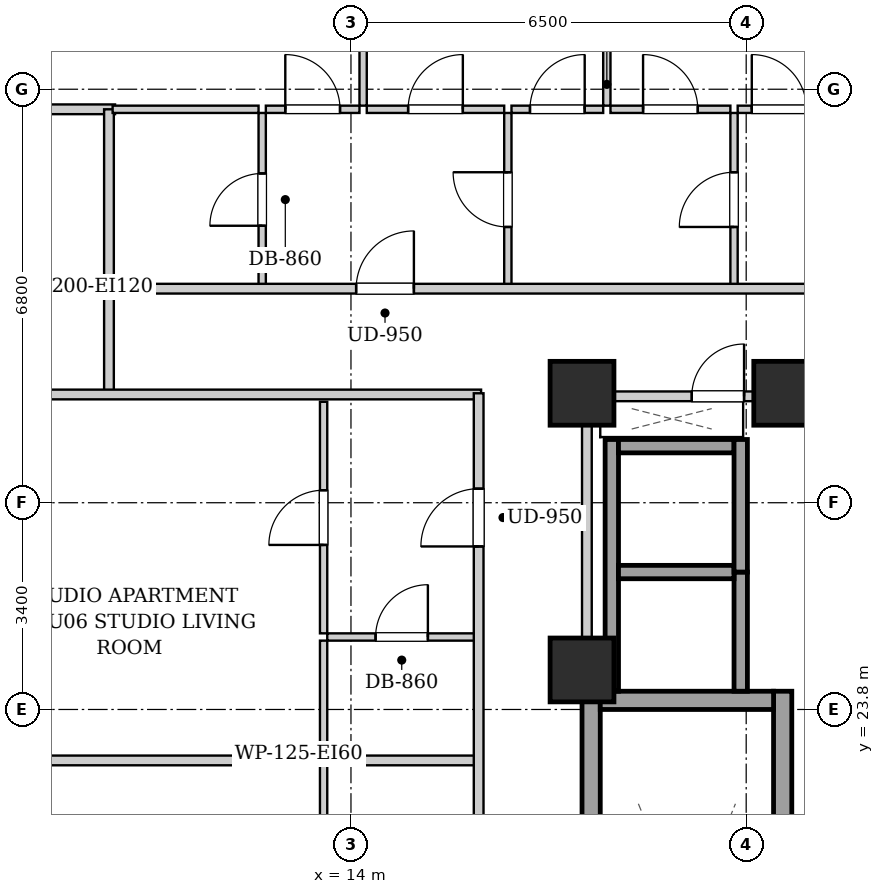
"""IFC4 building model, lengths in metres.
Left out: names, types, materials, properties, quantities, classifications, styles, units other than length and angle.
Written with IfcOpenShell. Run it as: python <this file> out.ifc"""

import sys

from ifc_helpers import new_model, si_unit, direction, frame, frame_2d, origin, origin_2d, place, context, subcontext, project, spatial, rectangle, extrude, element, fill, save


model = new_model("IFC4")
c1 = context("Model", 3, precision=1e-05, world=origin(), true_north=direction((0.0, 1.0)))
c2 = subcontext(c1, "Body", "Model", "MODEL_VIEW")
j1 = project(units=[si_unit("LENGTHUNIT", "METRE"), si_unit("PLANEANGLEUNIT", "RADIAN")], contexts=[c1])
p1 = place(None, origin())
s1 = spatial("IfcSite", under=j1, at=p1, CompositionType="ELEMENT")
p2 = place(p1, origin())
s2 = spatial("IfcBuilding", under=s1, at=p2, CompositionType="ELEMENT")
p3 = place(p2, frame((0.0, 0.0, 113.5)))
s3 = spatial("IfcBuildingStorey", under=s2, at=p3, CompositionType="ELEMENT", Elevation=113.5)
for number, where, z_axis, x_axis in (
    (1, (17.8, 29.0, 0.0), (0.0, 0.0, 1.0), (1.0, 0.0, 0.0)),
    (2, (21.15, 29.0, 0.0), (0.0, 0.0, 1.0), (1.0, 0.0, 0.0)),
    (3, (17.8, 24.45, 0.0), (0.0, 0.0, 1.0), (1.0, 0.0, 0.0)),
):
    element("IfcColumn", number, at=place(p3, frame(where, z_axis=z_axis, x_axis=x_axis)), inside=s3, PredefinedType="COLUMN", context=c2, shape_type="SweptSolid", body=[
        extrude(rectangle(XDim=1.05, YDim=1.05, at=origin_2d()), origin(), (0.0, 0.0, 1.0), 3.2),
    ])
for number, where, z_axis, x_axis in (
    (4, (17.95, 15.1, 0.0), (0.0, 0.0, 1.0), (0.0, 1.0, 0.0)),
    (5, (21.1, 15.1, 0.0), (0.0, 0.0, 1.0), (0.0, 1.0, 0.0)),
):
    element("IfcWall", number, at=place(p3, frame(where, z_axis=z_axis, x_axis=x_axis)), inside=s3, PredefinedType="SHEAR", context=c2, shape_type="SweptSolid", body=[
        extrude(rectangle(XDim=9.0, YDim=0.3, at=frame_2d((4.5, 0.0))), origin(), (0.0, 0.0, 1.0), 2.94),
    ])
p4 = place(p3, frame((18.1, 23.95, 0.0), z_axis=(0.0, 0.0, 1.0), x_axis=(1.0, 0.0, 0.0)))
e6 = element("IfcWall", 6, at=p4, inside=s3, PredefinedType="SHEAR", context=c2, shape_type="SweptSolid", body=[
    extrude(rectangle(XDim=2.85, YDim=0.3, at=frame_2d((1.425, 0.0))), origin(), (0.0, 0.0, 1.0), 2.94),
])
p5 = place(p3, frame((18.29, 24.1, 0.0), z_axis=(0.0, 0.0, 1.0), x_axis=(0.0, 1.0, 0.0)))
e7 = element("IfcWall", 7, at=p5, inside=s3, PredefinedType="SHEAR", context=c2, shape_type="SweptSolid", body=[
    extrude(rectangle(XDim=4.14, YDim=0.22, at=frame_2d((2.07, 0.0))), origin(), (0.0, 0.0, 1.0), 2.94),
])
p6 = place(p3, frame((20.41, 24.1, 0.0), z_axis=(0.0, 0.0, 1.0), x_axis=(0.0, 1.0, 0.0)))
e8 = element("IfcWall", 8, at=p6, inside=s3, PredefinedType="SHEAR", context=c2, shape_type="SweptSolid", body=[
    extrude(rectangle(XDim=1.96, YDim=0.22, at=frame_2d((0.98, 0.0))), origin(), (0.0, 0.0, 1.0), 2.94),
])
for number, where, z_axis, x_axis in (
    (9, (18.4, 26.06, 0.0), (0.0, 0.0, 1.0), (1.0, 0.0, 0.0)),
    (10, (18.4, 28.13, 0.0), (0.0, 0.0, 1.0), (1.0, 0.0, 0.0)),
):
    element("IfcWall", number, at=place(p3, frame(where, z_axis=z_axis, x_axis=x_axis)), inside=s3, PredefinedType="SHEAR", context=c2, shape_type="SweptSolid", body=[
        extrude(rectangle(XDim=1.9, YDim=0.22, at=frame_2d((0.95, 0.0))), origin(), (0.0, 0.0, 1.0), 2.94),
    ])
p7 = place(p3, frame((20.41, 26.06, 0.0), z_axis=(0.0, 0.0, 1.0), x_axis=(0.0, 1.0, 0.0)))
e11 = element("IfcWall", 11, at=p7, inside=s3, PredefinedType="SHEAR", context=c2, shape_type="SweptSolid", body=[
    extrude(rectangle(XDim=2.18, YDim=0.22, at=frame_2d((1.09, 0.0))), origin(), (0.0, 0.0, 1.0), 2.94),
])
p8 = place(p3, frame((17.88, 24.12, 0.0), z_axis=(0.0, 0.0, 1.0), x_axis=(0.0, 1.0, 0.0)))
e12 = element("IfcWall", 12, at=p8, inside=s3, PredefinedType="PARTITIONING", context=c2, shape_type="SweptSolid", body=[
    extrude(rectangle(XDim=4.76, YDim=0.16, at=frame_2d((2.38, 0.0))), origin(), (0.0, 0.0, 1.0), 2.94),
])
p9 = place(p3, frame((17.96, 28.95, 0.0), z_axis=(0.0, 0.0, 1.0), x_axis=(1.0, 0.0, 0.0)))
e13 = element("IfcWall", 13, at=p9, inside=s3, PredefinedType="PARTITIONING", context=c2, shape_type="SweptSolid", body=[
    extrude(rectangle(XDim=4.29, YDim=0.16, at=frame_2d((2.145, 0.0))), origin(), (0.0, 0.0, 1.0), 2.313),
])
p10 = place(p9, frame((1.645, 0.0, 0.0)))
e14 = element("IfcOpeningElement", 14, at=p10, cuts=e13, PredefinedType="OPENING", context=c2, shape_type="SweptSolid", body=[
    extrude(rectangle(XDim=0.86, YDim=2.05, at=frame_2d((0.43, 1.025))), frame((0.0, 0.09, 0.0), z_axis=(0.0, -1.0, 0.0), x_axis=(1.0, 0.0, 0.0)), (0.0, 0.0, 1.0), 0.18),
])
p11 = place(p3, frame((10.02, 28.98, 0.0), z_axis=(0.0, 0.0, 1.0), x_axis=(0.0, 1.0, 0.0)))
e15 = element("IfcWall", 15, at=p11, inside=s3, PredefinedType="PARTITIONING", context=c2, shape_type="SweptSolid", body=[
    extrude(rectangle(XDim=1.74, YDim=0.16, at=frame_2d((0.87, 0.0))), origin(), (0.0, 0.0, 1.0), 2.94),
])
p12 = place(p3, frame((7.78, 28.98, 0.0), z_axis=(0.0, 0.0, 1.0), x_axis=(1.0, 0.0, 0.0)))
e16 = element("IfcWall", 16, at=p12, inside=s3, PredefinedType="PARTITIONING", context=c2, shape_type="SweptSolid", body=[
    extrude(rectangle(XDim=8.36, YDim=0.16, at=frame_2d((4.18, 0.0))), origin(), (0.0, 0.0, 1.0), 2.313),
])
p13 = place(p3, frame((7.78, 33.67, 0.0), z_axis=(0.0, 0.0, 1.0), x_axis=(1.0, 0.0, 0.0)))
e17 = element("IfcWall", 17, at=p13, inside=s3, PredefinedType="PARTITIONING", context=c2, shape_type="SweptSolid", body=[
    extrude(rectangle(XDim=2.34, YDim=0.16, at=frame_2d((1.17, 0.0))), origin(), (0.0, 0.0, 1.0), 2.94),
])
p14 = place(p3, frame((10.02, 30.76, 0.0), z_axis=(0.0, 0.0, 1.0), x_axis=(0.0, 1.0, 0.0)))
e18 = element("IfcWall", 18, at=p14, inside=s3, PredefinedType="PARTITIONING", context=c2, shape_type="SweptSolid", body=[
    extrude(rectangle(XDim=2.91, YDim=0.16, at=frame_2d((1.455, 0.0))), origin(), (0.0, 0.0, 1.0), 2.94),
])
p15 = place(p3, frame((12.54, 30.76, 0.0), z_axis=(0.0, 0.0, 1.0), x_axis=(0.0, 1.0, 0.0)))
e19 = element("IfcWall", 19, at=p15, inside=s3, PredefinedType="PARTITIONING", context=c2, shape_type="SweptSolid", body=[
    extrude(rectangle(XDim=2.85, YDim=0.12, at=frame_2d((1.425, 0.0))), origin(), (0.0, 0.0, 1.0), 2.94),
])
p16 = place(p15, frame((0.995, 0.0, 0.0)))
e20 = element("IfcOpeningElement", 20, at=p16, cuts=e19, PredefinedType="OPENING", context=c2, shape_type="SweptSolid", body=[
    extrude(rectangle(XDim=0.86, YDim=2.05, at=frame_2d((0.43, 1.025))), frame((0.0, 0.07, 0.0), z_axis=(0.0, -1.0, 0.0), x_axis=(1.0, 0.0, 0.0)), (0.0, 0.0, 1.0), 0.14),
])
p17 = place(p3, frame((10.08, 33.67, 0.0), z_axis=(0.0, 0.0, 1.0), x_axis=(1.0, 0.0, 0.0)))
e21 = element("IfcWall", 21, at=p17, inside=s3, PredefinedType="PARTITIONING", context=c2, shape_type="SweptSolid", body=[
    extrude(rectangle(XDim=2.4, YDim=0.12, at=frame_2d((1.2, 0.0))), origin(), (0.0, 0.0, 1.0), 2.94),
])
p18 = place(p3, frame((16.58, 30.76, 0.0), z_axis=(0.0, 0.0, 1.0), x_axis=(0.0, 1.0, 0.0)))
e22 = element("IfcWall", 22, at=p18, inside=s3, PredefinedType="PARTITIONING", context=c2, shape_type="SweptSolid", body=[
    extrude(rectangle(XDim=2.85, YDim=0.12, at=frame_2d((1.425, 0.0))), origin(), (0.0, 0.0, 1.0), 2.94),
])
p19 = place(p18, frame((0.975, 0.0, 0.0)))
e23 = element("IfcOpeningElement", 23, at=p19, cuts=e22, PredefinedType="OPENING", context=c2, shape_type="SweptSolid", body=[
    extrude(rectangle(XDim=0.9, YDim=2.05, at=frame_2d((0.45, 1.025))), frame((0.0, 0.07, 0.0), z_axis=(0.0, -1.0, 0.0), x_axis=(1.0, 0.0, 0.0)), (0.0, 0.0, 1.0), 0.14),
])
p20 = place(p3, frame((12.6, 33.67, 0.0), z_axis=(0.0, 0.0, 1.0), x_axis=(1.0, 0.0, 0.0)))
e24 = element("IfcWall", 24, at=p20, inside=s3, PredefinedType="PARTITIONING", context=c2, shape_type="SweptSolid", body=[
    extrude(rectangle(XDim=1.54, YDim=0.12, at=frame_2d((0.77, 0.0))), origin(), (0.0, 0.0, 1.0), 2.94),
])
p21 = place(p20, frame((0.32, 0.0, 0.0)))
e25 = element("IfcOpeningElement", 25, at=p21, cuts=e24, PredefinedType="OPENING", context=c2, shape_type="SweptSolid", body=[
    extrude(rectangle(XDim=0.9, YDim=2.05, at=frame_2d((0.45, 1.025))), frame((0.0, 0.07, 0.0), z_axis=(0.0, -1.0, 0.0), x_axis=(1.0, 0.0, 0.0)), (0.0, 0.0, 1.0), 0.14),
])
p22 = place(p3, frame((14.26, 33.67, 0.0), z_axis=(0.0, 0.0, 1.0), x_axis=(1.0, 0.0, 0.0)))
e26 = element("IfcWall", 26, at=p22, inside=s3, PredefinedType="PARTITIONING", context=c2, shape_type="SweptSolid", body=[
    extrude(rectangle(XDim=2.26, YDim=0.12, at=frame_2d((1.13, 0.0))), origin(), (0.0, 0.0, 1.0), 2.94),
])
p23 = place(p22, frame((0.68, 0.0, 0.0)))
e27 = element("IfcOpeningElement", 27, at=p23, cuts=e26, PredefinedType="OPENING", context=c2, shape_type="SweptSolid", body=[
    extrude(rectangle(XDim=0.9, YDim=2.05, at=frame_2d((0.45, 1.025))), frame((0.0, 0.07, 0.0), z_axis=(0.0, -1.0, 0.0), x_axis=(1.0, 0.0, 0.0)), (0.0, 0.0, 1.0), 0.14),
])
p24 = place(p3, frame((20.3, 30.76, 0.0), z_axis=(0.0, 0.0, 1.0), x_axis=(0.0, 1.0, 0.0)))
e28 = element("IfcWall", 28, at=p24, inside=s3, PredefinedType="PARTITIONING", context=c2, shape_type="SweptSolid", body=[
    extrude(rectangle(XDim=2.85, YDim=0.12, at=frame_2d((1.425, 0.0))), origin(), (0.0, 0.0, 1.0), 2.94),
])
p25 = place(p24, frame((0.975, 0.0, 0.0)))
e29 = element("IfcOpeningElement", 29, at=p25, cuts=e28, PredefinedType="OPENING", context=c2, shape_type="SweptSolid", body=[
    extrude(rectangle(XDim=0.9, YDim=2.05, at=frame_2d((0.45, 1.025))), frame((0.0, 0.07, 0.0), z_axis=(0.0, -1.0, 0.0), x_axis=(1.0, 0.0, 0.0)), (0.0, 0.0, 1.0), 0.14),
])
p26 = place(p3, frame((16.64, 33.67, 0.0), z_axis=(0.0, 0.0, 1.0), x_axis=(1.0, 0.0, 0.0)))
e30 = element("IfcWall", 30, at=p26, inside=s3, PredefinedType="PARTITIONING", context=c2, shape_type="SweptSolid", body=[
    extrude(rectangle(XDim=1.508, YDim=0.12, at=frame_2d((0.754, 0.0))), origin(), (0.0, 0.0, 1.0), 2.94),
])
p27 = place(p26, frame((0.304, 0.0, 0.0)))
e31 = element("IfcOpeningElement", 31, at=p27, cuts=e30, PredefinedType="OPENING", context=c2, shape_type="SweptSolid", body=[
    extrude(rectangle(XDim=0.9, YDim=2.05, at=frame_2d((0.45, 1.025))), frame((0.0, 0.07, 0.0), z_axis=(0.0, -1.0, 0.0), x_axis=(1.0, 0.0, 0.0)), (0.0, 0.0, 1.0), 0.14),
])
p28 = place(p3, frame((18.268, 33.67, 0.0), z_axis=(0.0, 0.0, 1.0), x_axis=(1.0, 0.0, 0.0)))
e32 = element("IfcWall", 32, at=p28, inside=s3, PredefinedType="PARTITIONING", context=c2, shape_type="SweptSolid", body=[
    extrude(rectangle(XDim=1.972, YDim=0.12, at=frame_2d((0.986, 0.0))), origin(), (0.0, 0.0, 1.0), 2.94),
])
p29 = place(p28, frame((0.536, 0.0, 0.0)))
e33 = element("IfcOpeningElement", 33, at=p29, cuts=e32, PredefinedType="OPENING", context=c2, shape_type="SweptSolid", body=[
    extrude(rectangle(XDim=0.9, YDim=2.05, at=frame_2d((0.45, 1.025))), frame((0.0, 0.07, 0.0), z_axis=(0.0, -1.0, 0.0), x_axis=(1.0, 0.0, 0.0)), (0.0, 0.0, 1.0), 0.14),
])
p30 = place(p3, frame((20.36, 33.67, 0.0), z_axis=(0.0, 0.0, 1.0), x_axis=(1.0, 0.0, 0.0)))
e34 = element("IfcWall", 34, at=p30, inside=s3, PredefinedType="PARTITIONING", context=c2, shape_type="SweptSolid", body=[
    extrude(rectangle(XDim=1.364, YDim=0.12, at=frame_2d((0.682, 0.0))), origin(), (0.0, 0.0, 1.0), 2.94),
])
p31 = place(p30, frame((0.232, 0.0, 0.0)))
e35 = element("IfcOpeningElement", 35, at=p31, cuts=e34, PredefinedType="OPENING", context=c2, shape_type="SweptSolid", body=[
    extrude(rectangle(XDim=0.9, YDim=2.05, at=frame_2d((0.45, 1.025))), frame((0.0, 0.07, 0.0), z_axis=(0.0, -1.0, 0.0), x_axis=(1.0, 0.0, 0.0)), (0.0, 0.0, 1.0), 0.14),
])
p32 = place(p3, frame((14.2, 33.73, 0.0), z_axis=(0.0, 0.0, 1.0), x_axis=(0.0, 1.0, 0.0)))
e36 = element("IfcWall", 36, at=p32, inside=s3, PredefinedType="PARTITIONING", context=c2, shape_type="SweptSolid", body=[
    extrude(rectangle(XDim=9.29, YDim=0.12, at=frame_2d((4.645, 0.0))), origin(), (0.0, 0.0, 1.0), 2.94),
])
p33 = place(p32, frame((4.18, 0.0, 0.0)))
e37 = element("IfcOpeningElement", 37, at=p33, cuts=e36, PredefinedType="OPENING", context=c2, shape_type="SweptSolid", body=[
    extrude(rectangle(XDim=0.9, YDim=2.05, at=frame_2d((0.45, 1.025))), frame((0.0, 0.07, 0.0), z_axis=(0.0, -1.0, 0.0), x_axis=(1.0, 0.0, 0.0)), (0.0, 0.0, 1.0), 0.14),
])
p34 = place(p3, frame((18.208, 33.73, 0.0), z_axis=(0.0, 0.0, 1.0), x_axis=(0.0, 1.0, 0.0)))
e38 = element("IfcWall", 38, at=p34, inside=s3, PredefinedType="PARTITIONING", context=c2, shape_type="SweptSolid", body=[
    extrude(rectangle(XDim=9.29, YDim=0.12, at=frame_2d((4.645, 0.0))), origin(), (0.0, 0.0, 1.0), 2.94),
])
p35 = place(p34, frame((4.18, 0.0, 0.0)))
e39 = element("IfcOpeningElement", 39, at=p35, cuts=e38, PredefinedType="OPENING", context=c2, shape_type="SweptSolid", body=[
    extrude(rectangle(XDim=0.9, YDim=2.05, at=frame_2d((0.45, 1.025))), frame((0.0, 0.07, 0.0), z_axis=(0.0, -1.0, 0.0), x_axis=(1.0, 0.0, 0.0)), (0.0, 0.0, 1.0), 0.14),
])
p36 = place(p3, frame((7.78, 22.962, 0.0), z_axis=(0.0, 0.0, 1.0), x_axis=(1.0, 0.0, 0.0)))
e40 = element("IfcWall", 40, at=p36, inside=s3, PredefinedType="PARTITIONING", context=c2, shape_type="SweptSolid", body=[
    extrude(rectangle(XDim=8.28, YDim=0.16, at=frame_2d((4.14, 0.0))), origin(), (0.0, 0.0, 1.0), 2.94),
])
p37 = place(p3, frame((13.55, 17.489, 0.0), z_axis=(0.0, 0.0, 1.0), x_axis=(0.0, 1.0, 0.0)))
e41 = element("IfcWall", 41, at=p37, inside=s3, PredefinedType="PARTITIONING", context=c2, shape_type="SweptSolid", body=[
    extrude(rectangle(XDim=5.433, YDim=0.12, at=frame_2d((2.717, 0.0))), origin(), (0.0, 0.0, 1.0), 2.94),
])
p38 = place(p37, frame((2.266, 0.0, 0.0)))
e42 = element("IfcOpeningElement", 42, at=p38, cuts=e41, PredefinedType="OPENING", context=c2, shape_type="SweptSolid", body=[
    extrude(rectangle(XDim=0.9, YDim=2.05, at=frame_2d((0.45, 1.025))), frame((0.0, 0.07, 0.0), z_axis=(0.0, -1.0, 0.0), x_axis=(1.0, 0.0, 0.0)), (0.0, 0.0, 1.0), 0.14),
])
p39 = place(p3, frame((13.61, 24.992, 0.0), z_axis=(0.0, 0.0, 1.0), x_axis=(1.0, 0.0, 0.0)))
e43 = element("IfcWall", 43, at=p39, inside=s3, PredefinedType="PARTITIONING", context=c2, shape_type="SweptSolid", body=[
    extrude(rectangle(XDim=2.45, YDim=0.12, at=frame_2d((1.225, 0.0))), origin(), (0.0, 0.0, 1.0), 2.94),
])
p40 = place(p39, frame((0.795, 0.0, 0.0)))
e44 = element("IfcOpeningElement", 44, at=p40, cuts=e43, PredefinedType="OPENING", context=c2, shape_type="SweptSolid", body=[
    extrude(rectangle(XDim=0.86, YDim=2.05, at=frame_2d((0.43, 1.025))), frame((0.0, 0.07, 0.0), z_axis=(0.0, -1.0, 0.0), x_axis=(1.0, 0.0, 0.0)), (0.0, 0.0, 1.0), 0.14),
])
p41 = place(p3, frame((13.55, 23.082, 0.0), z_axis=(0.0, 0.0, 1.0), x_axis=(0.0, 1.0, 0.0)))
e45 = element("IfcWall", 45, at=p41, inside=s3, PredefinedType="PARTITIONING", context=c2, shape_type="SweptSolid", body=[
    extrude(rectangle(XDim=1.85, YDim=0.12, at=frame_2d((0.925, 0.0))), origin(), (0.0, 0.0, 1.0), 2.94),
])
p42 = place(p3, frame((13.55, 25.052, 0.0), z_axis=(0.0, 0.0, 1.0), x_axis=(0.0, 1.0, 0.0)))
e46 = element("IfcWall", 46, at=p42, inside=s3, PredefinedType="PARTITIONING", context=c2, shape_type="SweptSolid", body=[
    extrude(rectangle(XDim=3.808, YDim=0.12, at=frame_2d((1.904, 0.0))), origin(), (0.0, 0.0, 1.0), 2.94),
])
p43 = place(p42, frame((1.454, 0.0, 0.0)))
e47 = element("IfcOpeningElement", 47, at=p43, cuts=e46, PredefinedType="OPENING", context=c2, shape_type="SweptSolid", body=[
    extrude(rectangle(XDim=0.9, YDim=2.05, at=frame_2d((0.45, 1.025))), frame((0.0, 0.07, 0.0), z_axis=(0.0, -1.0, 0.0), x_axis=(1.0, 0.0, 0.0)), (0.0, 0.0, 1.0), 0.14),
])
p44 = place(p3, frame((10.05, 30.72, 0.0), z_axis=(0.0, 0.0, 1.0), x_axis=(1.0, 0.0, 0.0)))
e48 = element("IfcWall", 48, at=p44, inside=s3, PredefinedType="PARTITIONING", context=c2, shape_type="SweptSolid", body=[
    extrude(rectangle(XDim=30.8, YDim=0.16, at=frame_2d((15.4, 0.0))), origin(), (0.0, 0.0, 1.0), 2.94),
])
p45 = place(p44, frame((4.035, 0.0, 0.0)))
e49 = element("IfcOpeningElement", 49, at=p45, cuts=e48, PredefinedType="OPENING", context=c2, shape_type="SweptSolid", body=[
    extrude(rectangle(XDim=0.95, YDim=2.1, at=frame_2d((0.475, 1.05))), frame((0.0, 0.09, 0.0), z_axis=(0.0, -1.0, 0.0), x_axis=(1.0, 0.0, 0.0)), (0.0, 0.0, 1.0), 0.18),
])
p46 = place(p44, frame((25.11, 0.0, 0.0)))
e50 = element("IfcOpeningElement", 50, at=p46, cuts=e48, PredefinedType="OPENING", context=c2, shape_type="SweptSolid", body=[
    extrude(rectangle(XDim=0.95, YDim=2.1, at=frame_2d((0.475, 1.05))), frame((0.0, 0.09, 0.0), z_axis=(0.0, -1.0, 0.0), x_axis=(1.0, 0.0, 0.0)), (0.0, 0.0, 1.0), 0.18),
])
p47 = place(p3, frame((16.1, 15.07, 0.0), z_axis=(0.0, 0.0, 1.0), x_axis=(0.0, 1.0, 0.0)))
e51 = element("IfcWall", 51, at=p47, inside=s3, PredefinedType="PARTITIONING", context=c2, shape_type="SweptSolid", body=[
    extrude(rectangle(XDim=13.93, YDim=0.16, at=frame_2d((6.965, 0.0))), origin(), (0.0, 0.0, 1.0), 2.94),
])
p48 = place(p47, frame((4.661, 0.0, 0.0)))
e52 = element("IfcOpeningElement", 52, at=p48, cuts=e51, PredefinedType="OPENING", context=c2, shape_type="SweptSolid", body=[
    extrude(rectangle(XDim=0.95, YDim=2.1, at=frame_2d((0.475, 1.05))), frame((0.0, 0.09, 0.0), z_axis=(0.0, -1.0, 0.0), x_axis=(1.0, 0.0, 0.0)), (0.0, 0.0, 1.0), 0.18),
])
p49 = place(p47, frame((11.411, 0.0, 0.0)))
e53 = element("IfcOpeningElement", 53, at=p49, cuts=e51, PredefinedType="OPENING", context=c2, shape_type="SweptSolid", body=[
    extrude(rectangle(XDim=0.95, YDim=2.1, at=frame_2d((0.475, 1.05))), frame((0.0, 0.09, 0.0), z_axis=(0.0, -1.0, 0.0), x_axis=(1.0, 0.0, 0.0)), (0.0, 0.0, 1.0), 0.18),
])
p50 = place(p10, origin())
e54 = element("IfcDoor", 54, at=p50, inside=s3, OperationType="SINGLE_SWING_RIGHT", PredefinedType="DOOR", context=c2, shape_type="SweptSolid", body=[
    extrude(rectangle(XDim=0.86, YDim=2.05, at=frame_2d((0.43, 1.025))), frame((0.0, 0.025, 0.0), z_axis=(0.0, -1.0, 0.0), x_axis=(1.0, 0.0, 0.0)), (0.0, 0.0, 1.0), 0.05),
])
fill(e14, e54)
p51 = place(p16, origin())
e55 = element("IfcDoor", 55, at=p51, inside=s3, OperationType="SINGLE_SWING_LEFT", PredefinedType="DOOR", context=c2, shape_type="SweptSolid", body=[
    extrude(rectangle(XDim=0.86, YDim=2.05, at=frame_2d((0.43, 1.025))), frame((0.0, 0.025, 0.0), z_axis=(0.0, -1.0, 0.0), x_axis=(1.0, 0.0, 0.0)), (0.0, 0.0, 1.0), 0.05),
])
fill(e20, e55)
p52 = place(p19, origin())
e56 = element("IfcDoor", 56, at=p52, inside=s3, OperationType="SINGLE_SWING_RIGHT", PredefinedType="DOOR", context=c2, shape_type="SweptSolid", body=[
    extrude(rectangle(XDim=0.9, YDim=2.05, at=frame_2d((0.45, 1.025))), frame((0.0, 0.025, 0.0), z_axis=(0.0, -1.0, 0.0), x_axis=(1.0, 0.0, 0.0)), (0.0, 0.0, 1.0), 0.05),
])
fill(e23, e56)
p53 = place(p21, origin())
e57 = element("IfcDoor", 57, at=p53, inside=s3, OperationType="SINGLE_SWING_LEFT", PredefinedType="DOOR", context=c2, shape_type="SweptSolid", body=[
    extrude(rectangle(XDim=0.9, YDim=2.05, at=frame_2d((0.45, 1.025))), frame((0.0, 0.025, 0.0), z_axis=(0.0, -1.0, 0.0), x_axis=(1.0, 0.0, 0.0)), (0.0, 0.0, 1.0), 0.05),
])
fill(e25, e57)
p54 = place(p23, origin())
e58 = element("IfcDoor", 58, at=p54, inside=s3, OperationType="SINGLE_SWING_RIGHT", PredefinedType="DOOR", context=c2, shape_type="SweptSolid", body=[
    extrude(rectangle(XDim=0.9, YDim=2.05, at=frame_2d((0.45, 1.025))), frame((0.0, 0.025, 0.0), z_axis=(0.0, -1.0, 0.0), x_axis=(1.0, 0.0, 0.0)), (0.0, 0.0, 1.0), 0.05),
])
fill(e27, e58)
p55 = place(p25, origin())
e59 = element("IfcDoor", 59, at=p55, inside=s3, OperationType="SINGLE_SWING_LEFT", PredefinedType="DOOR", context=c2, shape_type="SweptSolid", body=[
    extrude(rectangle(XDim=0.9, YDim=2.05, at=frame_2d((0.45, 1.025))), frame((0.0, 0.025, 0.0), z_axis=(0.0, -1.0, 0.0), x_axis=(1.0, 0.0, 0.0)), (0.0, 0.0, 1.0), 0.05),
])
fill(e29, e59)
p56 = place(p27, origin())
e60 = element("IfcDoor", 60, at=p56, inside=s3, OperationType="SINGLE_SWING_RIGHT", PredefinedType="DOOR", context=c2, shape_type="SweptSolid", body=[
    extrude(rectangle(XDim=0.9, YDim=2.05, at=frame_2d((0.45, 1.025))), frame((0.0, 0.025, 0.0), z_axis=(0.0, -1.0, 0.0), x_axis=(1.0, 0.0, 0.0)), (0.0, 0.0, 1.0), 0.05),
])
fill(e31, e60)
p57 = place(p29, origin())
e61 = element("IfcDoor", 61, at=p57, inside=s3, OperationType="SINGLE_SWING_LEFT", PredefinedType="DOOR", context=c2, shape_type="SweptSolid", body=[
    extrude(rectangle(XDim=0.9, YDim=2.05, at=frame_2d((0.45, 1.025))), frame((0.0, 0.025, 0.0), z_axis=(0.0, -1.0, 0.0), x_axis=(1.0, 0.0, 0.0)), (0.0, 0.0, 1.0), 0.05),
])
fill(e33, e61)
p58 = place(p31, origin())
e62 = element("IfcDoor", 62, at=p58, inside=s3, OperationType="SINGLE_SWING_LEFT", PredefinedType="DOOR", context=c2, shape_type="SweptSolid", body=[
    extrude(rectangle(XDim=0.9, YDim=2.05, at=frame_2d((0.45, 1.025))), frame((0.0, 0.025, 0.0), z_axis=(0.0, -1.0, 0.0), x_axis=(1.0, 0.0, 0.0)), (0.0, 0.0, 1.0), 0.05),
])
fill(e35, e62)
p59 = place(p40, origin())
e63 = element("IfcDoor", 63, at=p59, inside=s3, OperationType="SINGLE_SWING_RIGHT", PredefinedType="DOOR", context=c2, shape_type="SweptSolid", body=[
    extrude(rectangle(XDim=0.86, YDim=2.05, at=frame_2d((0.43, 1.025))), frame((0.0, 0.025, 0.0), z_axis=(0.0, -1.0, 0.0), x_axis=(1.0, 0.0, 0.0)), (0.0, 0.0, 1.0), 0.05),
])
fill(e44, e63)
p60 = place(p43, origin())
e64 = element("IfcDoor", 64, at=p60, inside=s3, OperationType="SINGLE_SWING_LEFT", PredefinedType="DOOR", context=c2, shape_type="SweptSolid", body=[
    extrude(rectangle(XDim=0.9, YDim=2.05, at=frame_2d((0.45, 1.025))), frame((0.0, 0.025, 0.0), z_axis=(0.0, -1.0, 0.0), x_axis=(1.0, 0.0, 0.0)), (0.0, 0.0, 1.0), 0.05),
])
fill(e47, e64)
p61 = place(p45, origin())
e65 = element("IfcDoor", 65, at=p61, inside=s3, OperationType="SINGLE_SWING_RIGHT", PredefinedType="DOOR", context=c2, shape_type="SweptSolid", body=[
    extrude(rectangle(XDim=0.95, YDim=2.1, at=frame_2d((0.475, 1.05))), frame((0.0, 0.025, 0.0), z_axis=(0.0, -1.0, 0.0), x_axis=(1.0, 0.0, 0.0)), (0.0, 0.0, 1.0), 0.05),
])
fill(e49, e65)
p62 = place(p49, origin())
e66 = element("IfcDoor", 66, at=p62, inside=s3, OperationType="SINGLE_SWING_LEFT", PredefinedType="DOOR", context=c2, shape_type="SweptSolid", body=[
    extrude(rectangle(XDim=0.95, YDim=2.1, at=frame_2d((0.475, 1.05))), frame((0.0, 0.025, 0.0), z_axis=(0.0, -1.0, 0.0), x_axis=(1.0, 0.0, 0.0)), (0.0, 0.0, 1.0), 0.05),
])
fill(e53, e66)
save(model, sys.argv[1])
